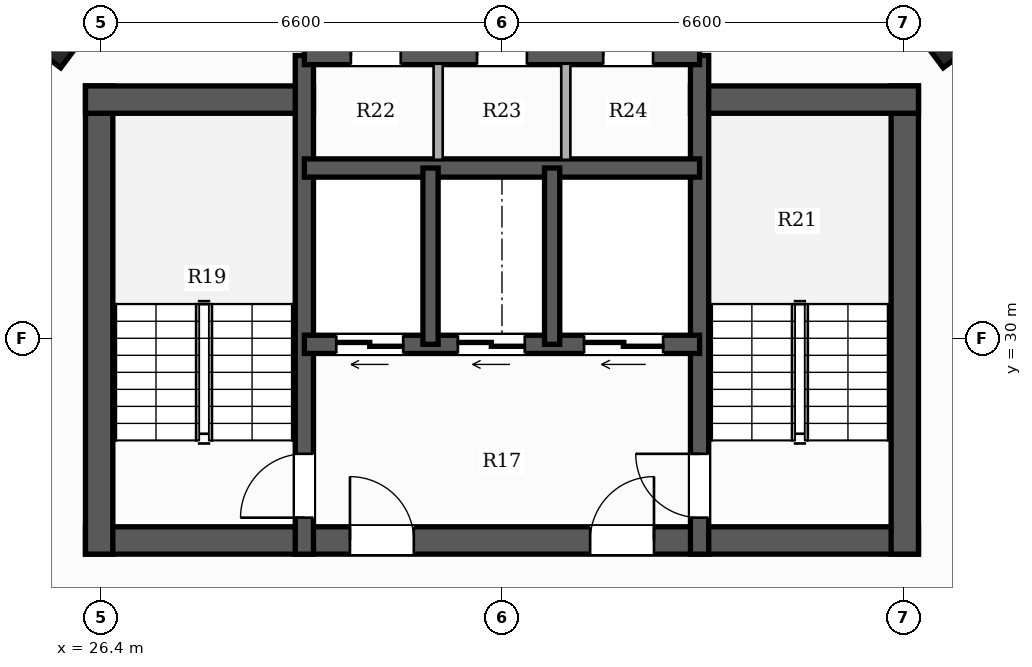
"""IFC4 building model, lengths in metres.
Left out: names, types, materials, properties, quantities, classifications, styles, units other than length and angle.
Written with IfcOpenShell. Run it as: python <this file> out.ifc"""

import sys

from ifc_helpers import new_model, si_unit, direction, frame, frame_2d, origin, origin_2d, place, context, subcontext, project, spatial, rectangle, hollow_rectangle, extrude, element, fill, save


model = new_model("IFC4")
c1 = context("Model", 3, precision=1e-05, world=origin(), true_north=direction((0.0, 1.0)))
c2 = subcontext(c1, "Body", "Model", "MODEL_VIEW")
j1 = project(units=[si_unit("LENGTHUNIT", "METRE"), si_unit("PLANEANGLEUNIT", "RADIAN")], contexts=[c1])
p1 = place(None, origin())
s1 = spatial("IfcSite", under=j1, at=p1, CompositionType="ELEMENT")
p2 = place(p1, origin())
s2 = spatial("IfcBuilding", under=s1, at=p2, CompositionType="ELEMENT")
p3 = place(p2, frame((0.0, 0.0, 64.25)))
s3 = spatial("IfcBuildingStorey", under=s2, at=p3, CompositionType="ELEMENT", Elevation=64.25)
p4 = place(p3, frame((26.15, 26.675, 0.0), z_axis=(0.0, 0.0, 1.0), x_axis=(1.0, 0.0, 0.0)))
e1 = element("IfcWall", 1, at=p4, inside=s3, PredefinedType="SHEAR", context=c2, shape_type="SweptSolid", body=[
    extrude(rectangle(XDim=13.7, YDim=0.45, at=frame_2d((6.85, 0.0))), origin(), (0.0, 0.0, 1.0), 3.3),
])
p5 = place(p4, frame((4.35, 0.0, 0.0)))
e2 = element("IfcOpeningElement", 2, at=p5, cuts=e1, PredefinedType="OPENING", context=c2, shape_type="SweptSolid", body=[
    extrude(rectangle(XDim=1.05, YDim=2.15, at=frame_2d((0.525, 1.075))), frame((0.0, 0.235, 0.0), z_axis=(0.0, -1.0, 0.0), x_axis=(1.0, 0.0, 0.0)), (0.0, 0.0, 1.0), 0.47),
])
p6 = place(p4, frame((8.3, 0.0, 0.0)))
e3 = element("IfcOpeningElement", 3, at=p6, cuts=e1, PredefinedType="OPENING", context=c2, shape_type="SweptSolid", body=[
    extrude(rectangle(XDim=1.05, YDim=2.15, at=frame_2d((0.525, 1.075))), frame((0.0, 0.235, 0.0), z_axis=(0.0, -1.0, 0.0), x_axis=(1.0, 0.0, 0.0)), (0.0, 0.0, 1.0), 0.47),
])
p7 = place(p3, frame((26.375, 26.45, 0.0), z_axis=(0.0, 0.0, 1.0), x_axis=(0.0, 1.0, 0.0)))
e4 = element("IfcWall", 4, at=p7, inside=s3, PredefinedType="SHEAR", context=c2, shape_type="SweptSolid", body=[
    extrude(rectangle(XDim=7.7, YDim=0.45, at=frame_2d((3.85, 0.0))), origin(), (0.0, 0.0, 1.0), 3.3),
])
p8 = place(p3, frame((26.15, 33.925, 0.0), z_axis=(0.0, 0.0, 1.0), x_axis=(1.0, 0.0, 0.0)))
e5 = element("IfcWall", 5, at=p8, inside=s3, PredefinedType="SHEAR", context=c2, shape_type="SweptSolid", body=[
    extrude(rectangle(XDim=3.75, YDim=0.45, at=frame_2d((1.875, 0.0))), origin(), (0.0, 0.0, 1.0), 3.3),
])
p9 = place(p3, frame((39.625, 26.45, 0.0), z_axis=(0.0, 0.0, 1.0), x_axis=(0.0, 1.0, 0.0)))
e6 = element("IfcWall", 6, at=p9, inside=s3, PredefinedType="SHEAR", context=c2, shape_type="SweptSolid", body=[
    extrude(rectangle(XDim=7.7, YDim=0.45, at=frame_2d((3.85, 0.0))), origin(), (0.0, 0.0, 1.0), 3.3),
])
p10 = place(p3, frame((36.1, 33.925, 0.0), z_axis=(0.0, 0.0, 1.0), x_axis=(1.0, 0.0, 0.0)))
e7 = element("IfcWall", 7, at=p10, inside=s3, PredefinedType="SHEAR", context=c2, shape_type="SweptSolid", body=[
    extrude(rectangle(XDim=3.75, YDim=0.45, at=frame_2d((1.875, 0.0))), origin(), (0.0, 0.0, 1.0), 3.3),
])
p11 = place(p3, frame((29.75, 26.45, 0.0), z_axis=(0.0, 0.0, 1.0), x_axis=(0.0, 1.0, 0.0)))
e8 = element("IfcWall", 8, at=p11, inside=s3, PredefinedType="SHEAR", context=c2, shape_type="SweptSolid", body=[
    extrude(rectangle(XDim=8.2, YDim=0.3, at=frame_2d((4.1, 0.0))), origin(), (0.0, 0.0, 1.0), 3.3),
])
p12 = place(p11, frame((0.6, 0.0, 0.0)))
e9 = element("IfcOpeningElement", 9, at=p12, cuts=e8, PredefinedType="OPENING", context=c2, shape_type="SweptSolid", body=[
    extrude(rectangle(XDim=1.05, YDim=2.15, at=frame_2d((0.525, 1.075))), frame((0.0, 0.16, 0.0), z_axis=(0.0, -1.0, 0.0), x_axis=(1.0, 0.0, 0.0)), (0.0, 0.0, 1.0), 0.32),
])
p13 = place(p3, frame((36.25, 26.45, 0.0), z_axis=(0.0, 0.0, 1.0), x_axis=(0.0, 1.0, 0.0)))
e10 = element("IfcWall", 10, at=p13, inside=s3, PredefinedType="SHEAR", context=c2, shape_type="SweptSolid", body=[
    extrude(rectangle(XDim=8.2, YDim=0.3, at=frame_2d((4.1, 0.0))), origin(), (0.0, 0.0, 1.0), 3.3),
])
p14 = place(p13, frame((0.6, 0.0, 0.0)))
e11 = element("IfcOpeningElement", 11, at=p14, cuts=e10, PredefinedType="OPENING", context=c2, shape_type="SweptSolid", body=[
    extrude(rectangle(XDim=1.05, YDim=2.15, at=frame_2d((0.525, 1.075))), frame((0.0, 0.16, 0.0), z_axis=(0.0, -1.0, 0.0), x_axis=(1.0, 0.0, 0.0)), (0.0, 0.0, 1.0), 0.32),
])
p15 = place(p3, frame((36.25, 29.9, 0.0), z_axis=(0.0, 0.0, 1.0), x_axis=(-1.0, 0.0, 0.0)))
e12 = element("IfcWall", 12, at=p15, inside=s3, PredefinedType="SHEAR", context=c2, shape_type="SweptSolid", body=[
    extrude(rectangle(XDim=6.5, YDim=0.3, at=frame_2d((3.25, 0.0))), origin(), (0.0, 0.0, 1.0), 3.3),
])
p16 = place(p15, frame((4.875, 0.0, 0.0)))
e13 = element("IfcOpeningElement", 13, at=p16, cuts=e12, PredefinedType="OPENING", context=c2, shape_type="SweptSolid", body=[
    extrude(rectangle(XDim=1.1, YDim=2.2, at=frame_2d((0.55, 1.1))), frame((0.0, 0.16, 0.0), z_axis=(0.0, -1.0, 0.0), x_axis=(1.0, 0.0, 0.0)), (0.0, 0.0, 1.0), 0.32),
])
p17 = place(p15, frame((2.875, 0.0, 0.0)))
e14 = element("IfcOpeningElement", 14, at=p17, cuts=e12, PredefinedType="OPENING", context=c2, shape_type="SweptSolid", body=[
    extrude(rectangle(XDim=1.1, YDim=2.2, at=frame_2d((0.55, 1.1))), frame((0.0, 0.16, 0.0), z_axis=(0.0, -1.0, 0.0), x_axis=(1.0, 0.0, 0.0)), (0.0, 0.0, 1.0), 0.32),
])
p18 = place(p15, frame((0.6, 0.0, 0.0)))
e15 = element("IfcOpeningElement", 15, at=p18, cuts=e12, PredefinedType="OPENING", context=c2, shape_type="SweptSolid", body=[
    extrude(rectangle(XDim=1.3, YDim=2.2, at=frame_2d((0.65, 1.1))), frame((0.0, 0.16, 0.0), z_axis=(0.0, -1.0, 0.0), x_axis=(1.0, 0.0, 0.0)), (0.0, 0.0, 1.0), 0.32),
])
p19 = place(p3, frame((29.75, 32.8, 0.0), z_axis=(0.0, 0.0, 1.0), x_axis=(1.0, 0.0, 0.0)))
e16 = element("IfcWall", 16, at=p19, inside=s3, PredefinedType="SHEAR", context=c2, shape_type="SweptSolid", body=[
    extrude(rectangle(XDim=6.5, YDim=0.3, at=frame_2d((3.25, 0.0))), origin(), (0.0, 0.0, 1.0), 3.3),
])
for number, where, z_axis, x_axis in (
    (17, (31.825, 29.9, 0.0), (0.0, 0.0, 1.0), (0.0, 1.0, 0.0)),
    (18, (33.825, 29.9, 0.0), (0.0, 0.0, 1.0), (0.0, 1.0, 0.0)),
):
    element("IfcWall", number, at=place(p3, frame(where, z_axis=z_axis, x_axis=x_axis)), inside=s3, PredefinedType="SHEAR", context=c2, shape_type="SweptSolid", body=[
        extrude(rectangle(XDim=2.9, YDim=0.25, at=frame_2d((1.45, 0.0))), origin(), (0.0, 0.0, 1.0), 3.3),
    ])
p20 = place(p3, frame((29.75, 34.65, 0.0), z_axis=(0.0, 0.0, 1.0), x_axis=(1.0, 0.0, 0.0)))
e19 = element("IfcWall", 19, at=p20, inside=s3, PredefinedType="SHEAR", context=c2, shape_type="SweptSolid", body=[
    extrude(rectangle(XDim=6.5, YDim=0.3, at=frame_2d((3.25, 0.0))), origin(), (0.0, 0.0, 1.0), 3.3),
])
p21 = place(p20, frame((0.765, 0.0, 0.0)))
e20 = element("IfcOpeningElement", 20, at=p21, cuts=e19, PredefinedType="OPENING", context=c2, shape_type="SweptSolid", body=[
    extrude(rectangle(XDim=0.82, YDim=2.1, at=frame_2d((0.41, 1.05))), frame((0.0, 0.16, 0.0), z_axis=(0.0, -1.0, 0.0), x_axis=(1.0, 0.0, 0.0)), (0.0, 0.0, 1.0), 0.32),
])
p22 = place(p20, frame((2.84, 0.0, 0.0)))
e21 = element("IfcOpeningElement", 21, at=p22, cuts=e19, PredefinedType="OPENING", context=c2, shape_type="SweptSolid", body=[
    extrude(rectangle(XDim=0.82, YDim=2.1, at=frame_2d((0.41, 1.05))), frame((0.0, 0.16, 0.0), z_axis=(0.0, -1.0, 0.0), x_axis=(1.0, 0.0, 0.0)), (0.0, 0.0, 1.0), 0.32),
])
p23 = place(p20, frame((4.915, 0.0, 0.0)))
e22 = element("IfcOpeningElement", 22, at=p23, cuts=e19, PredefinedType="OPENING", context=c2, shape_type="SweptSolid", body=[
    extrude(rectangle(XDim=0.82, YDim=2.1, at=frame_2d((0.41, 1.05))), frame((0.0, 0.16, 0.0), z_axis=(0.0, -1.0, 0.0), x_axis=(1.0, 0.0, 0.0)), (0.0, 0.0, 1.0), 0.32),
])
for number, where, z_axis, x_axis in (
    (23, (25.648, 35.113, 0.0), (0.0, 0.0, 1.0), (0.6, 0.8, 0.0)),
    (24, (40.352, 35.113, 0.0), (0.0, 0.0, 1.0), (-0.6, 0.8, 0.0)),
):
    element("IfcColumn", number, at=place(p3, frame(where, z_axis=z_axis, x_axis=x_axis)), inside=s3, PredefinedType="COLUMN", context=c2, shape_type="SweptSolid", body=[
        extrude(hollow_rectangle(XDim=0.95, YDim=0.95, WallThickness=0.032, at=origin_2d()), origin(), (0.0, 0.0, 1.0), 3.3),
    ])
for number, where, z_axis, x_axis in (
    (25, (31.95, 32.935, 0.0), (0.0, 0.0, 1.0), (0.0, 1.0, 0.0)),
    (26, (34.05, 32.935, 0.0), (0.0, 0.0, 1.0), (0.0, 1.0, 0.0)),
):
    element("IfcWall", number, at=place(p3, frame(where, z_axis=z_axis, x_axis=x_axis)), inside=s3, PredefinedType="PARTITIONING", context=c2, shape_type="SweptSolid", body=[
        extrude(rectangle(XDim=1.58, YDim=0.15, at=frame_2d((0.79, 0.0))), origin(), (0.0, 0.0, 1.0), 3.06),
    ])
p24 = place(p12, origin())
e27 = element("IfcDoor", 27, at=p24, inside=s3, OperationType="SINGLE_SWING_LEFT", PredefinedType="DOOR", context=c2, shape_type="SweptSolid", body=[
    extrude(rectangle(XDim=1.05, YDim=2.15, at=frame_2d((0.525, 1.075))), frame((0.0, 0.025, 0.0), z_axis=(0.0, -1.0, 0.0), x_axis=(1.0, 0.0, 0.0)), (0.0, 0.0, 1.0), 0.05),
])
fill(e9, e27)
p25 = place(p14, origin())
e28 = element("IfcDoor", 28, at=p25, inside=s3, OperationType="SINGLE_SWING_RIGHT", PredefinedType="DOOR", context=c2, shape_type="SweptSolid", body=[
    extrude(rectangle(XDim=1.05, YDim=2.15, at=frame_2d((0.525, 1.075))), frame((0.0, 0.025, 0.0), z_axis=(0.0, -1.0, 0.0), x_axis=(1.0, 0.0, 0.0)), (0.0, 0.0, 1.0), 0.05),
])
fill(e11, e28)
p26 = place(p5, origin())
e29 = element("IfcDoor", 29, at=p26, inside=s3, OperationType="SINGLE_SWING_LEFT", PredefinedType="DOOR", context=c2, shape_type="SweptSolid", body=[
    extrude(rectangle(XDim=1.05, YDim=2.15, at=frame_2d((0.525, 1.075))), frame((0.0, 0.025, 0.0), z_axis=(0.0, -1.0, 0.0), x_axis=(1.0, 0.0, 0.0)), (0.0, 0.0, 1.0), 0.05),
])
fill(e2, e29)
p27 = place(p6, origin())
e30 = element("IfcDoor", 30, at=p27, inside=s3, OperationType="SINGLE_SWING_RIGHT", PredefinedType="DOOR", context=c2, shape_type="SweptSolid", body=[
    extrude(rectangle(XDim=1.05, YDim=2.15, at=frame_2d((0.525, 1.075))), frame((0.0, 0.025, 0.0), z_axis=(0.0, -1.0, 0.0), x_axis=(1.0, 0.0, 0.0)), (0.0, 0.0, 1.0), 0.05),
])
fill(e3, e30)
p28 = place(p16, origin())
e31 = element("IfcDoor", 31, at=p28, inside=s3, OperationType="DOUBLE_DOOR_SLIDING", PredefinedType="DOOR", context=c2, shape_type="SweptSolid", body=[
    extrude(rectangle(XDim=1.1, YDim=2.2, at=frame_2d((0.55, 1.1))), frame((0.0, 0.025, 0.0), z_axis=(0.0, -1.0, 0.0), x_axis=(1.0, 0.0, 0.0)), (0.0, 0.0, 1.0), 0.05),
])
fill(e13, e31)
p29 = place(p17, origin())
e32 = element("IfcDoor", 32, at=p29, inside=s3, OperationType="DOUBLE_DOOR_SLIDING", PredefinedType="DOOR", context=c2, shape_type="SweptSolid", body=[
    extrude(rectangle(XDim=1.1, YDim=2.2, at=frame_2d((0.55, 1.1))), frame((0.0, 0.025, 0.0), z_axis=(0.0, -1.0, 0.0), x_axis=(1.0, 0.0, 0.0)), (0.0, 0.0, 1.0), 0.05),
])
fill(e14, e32)
p30 = place(p18, origin())
e33 = element("IfcDoor", 33, at=p30, inside=s3, OperationType="DOUBLE_DOOR_SLIDING", PredefinedType="DOOR", context=c2, shape_type="SweptSolid", body=[
    extrude(rectangle(XDim=1.3, YDim=2.2, at=frame_2d((0.65, 1.1))), frame((0.0, 0.025, 0.0), z_axis=(0.0, -1.0, 0.0), x_axis=(1.0, 0.0, 0.0)), (0.0, 0.0, 1.0), 0.05),
])
fill(e15, e33)
p31 = place(p21, origin())
e34 = element("IfcDoor", 34, at=p31, inside=s3, OperationType="SINGLE_SWING_LEFT", PredefinedType="DOOR", context=c2, shape_type="SweptSolid", body=[
    extrude(rectangle(XDim=0.82, YDim=2.1, at=frame_2d((0.41, 1.05))), frame((0.0, 0.025, 0.0), z_axis=(0.0, -1.0, 0.0), x_axis=(1.0, 0.0, 0.0)), (0.0, 0.0, 1.0), 0.05),
])
fill(e20, e34)
p32 = place(p22, origin())
e35 = element("IfcDoor", 35, at=p32, inside=s3, OperationType="SINGLE_SWING_LEFT", PredefinedType="DOOR", context=c2, shape_type="SweptSolid", body=[
    extrude(rectangle(XDim=0.82, YDim=2.1, at=frame_2d((0.41, 1.05))), frame((0.0, 0.025, 0.0), z_axis=(0.0, -1.0, 0.0), x_axis=(1.0, 0.0, 0.0)), (0.0, 0.0, 1.0), 0.05),
])
fill(e21, e35)
p33 = place(p23, origin())
e36 = element("IfcDoor", 36, at=p33, inside=s3, OperationType="SINGLE_SWING_LEFT", PredefinedType="DOOR", context=c2, shape_type="SweptSolid", body=[
    extrude(rectangle(XDim=0.82, YDim=2.1, at=frame_2d((0.41, 1.05))), frame((0.0, 0.025, 0.0), z_axis=(0.0, -1.0, 0.0), x_axis=(1.0, 0.0, 0.0)), (0.0, 0.0, 1.0), 0.05),
])
fill(e22, e36)
save(model, sys.argv[1])
